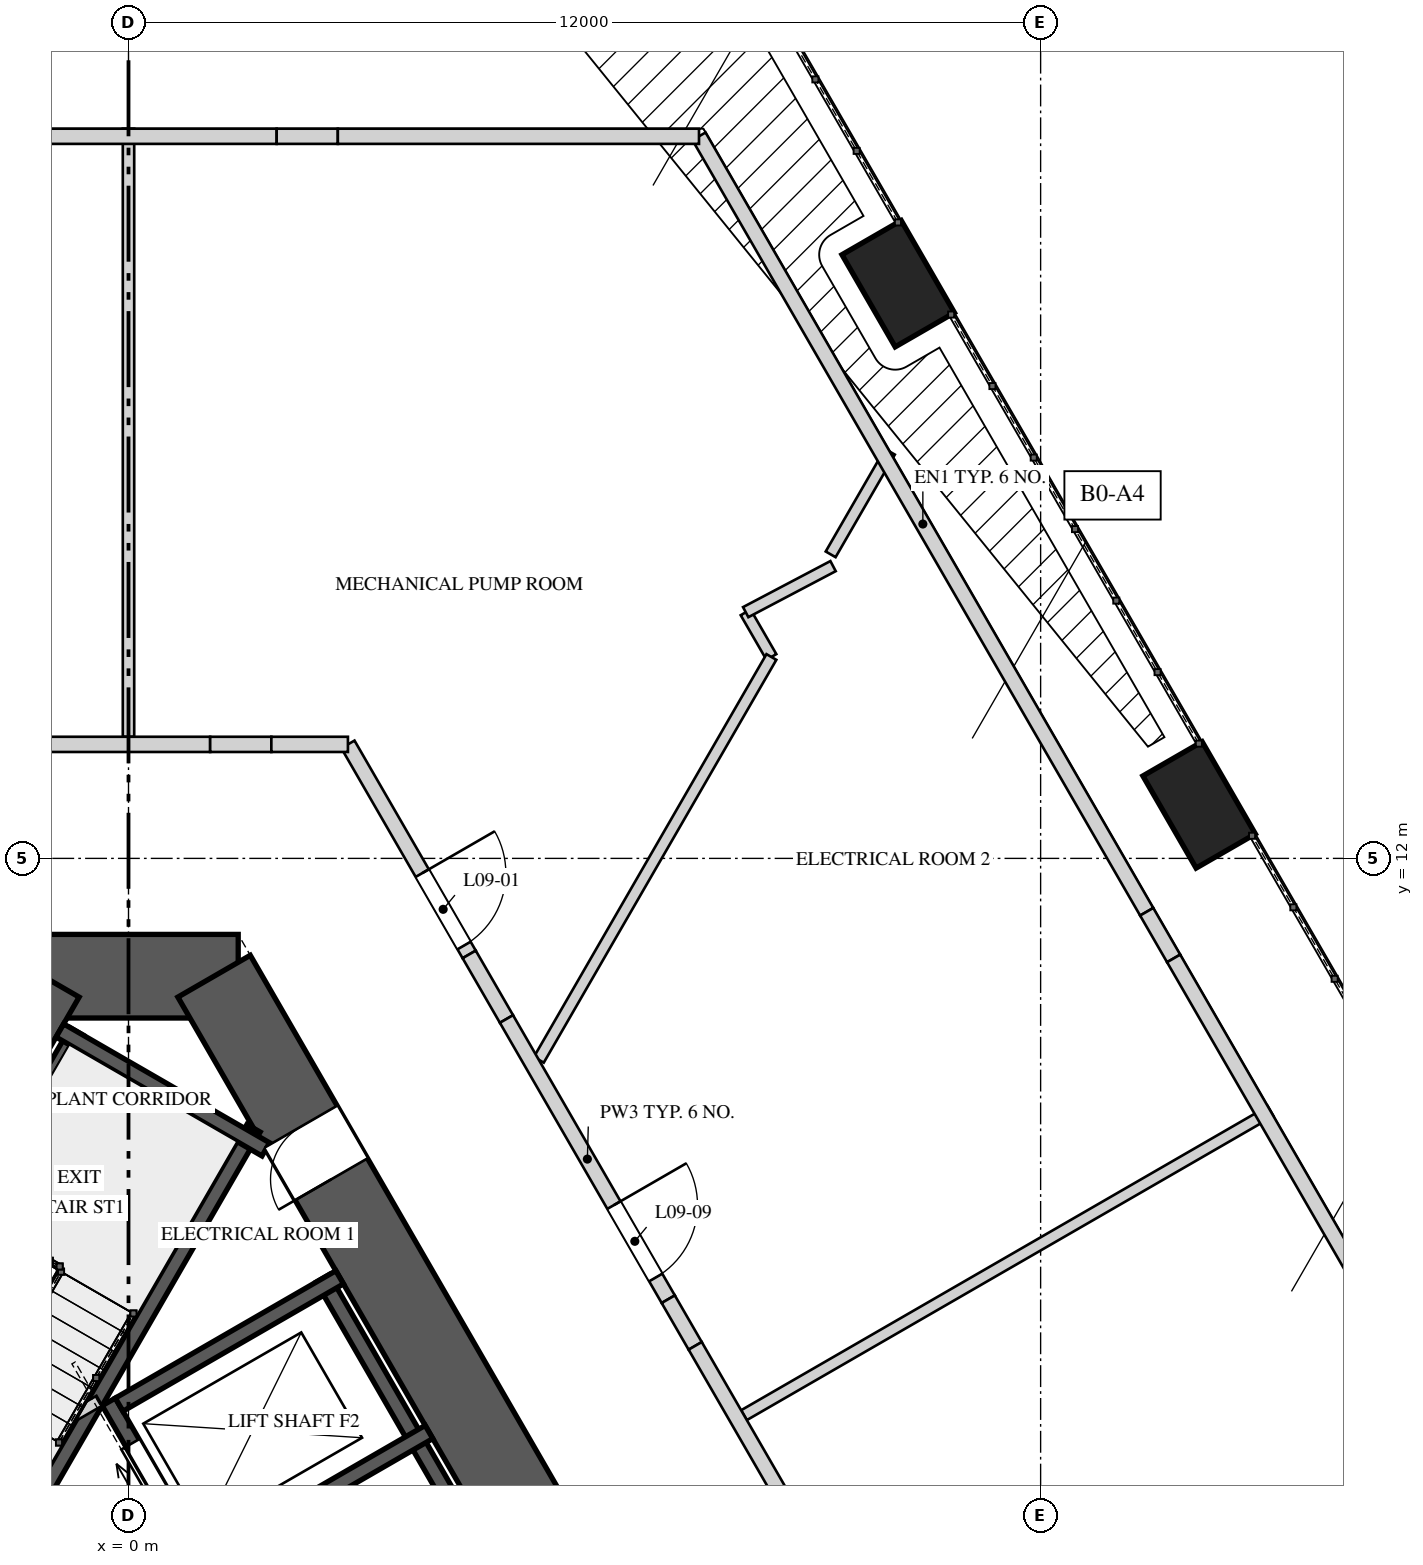
"""IFC4 building model, lengths in metres.
Left out: names, types, materials, properties, quantities, classifications, styles, units other than length and angle.
Written with IfcOpenShell. Run it as: python <this file> out.ifc"""

import sys

from ifc_helpers import new_model, si_unit, direction, frame, frame_2d, origin, origin_2d, place, context, subcontext, project, spatial, rectangle, extrude, element, fill, save


model = new_model("IFC4")
c1 = context("Model", 3, precision=1e-05, world=origin(), true_north=direction((0.0, 1.0)))
c2 = subcontext(c1, "Body", "Model", "MODEL_VIEW")
j1 = project(units=[si_unit("LENGTHUNIT", "METRE"), si_unit("PLANEANGLEUNIT", "RADIAN")], contexts=[c1])
p1 = place(None, origin())
s1 = spatial("IfcSite", under=j1, at=p1, CompositionType="ELEMENT")
p2 = place(p1, origin())
s2 = spatial("IfcBuilding", under=s1, at=p2, CompositionType="ELEMENT")
p3 = place(p2, frame((0.0, 0.0, 46.0)))
s3 = spatial("IfcBuildingStorey", under=s2, at=p3, CompositionType="ELEMENT", Elevation=46.0)
p4 = place(p3, frame((1.443, 10.45, 0.0), z_axis=(0.0, 0.0, 1.0), x_axis=(-1.0, 0.0, 0.0)))
e1 = element("IfcWall", 1, at=p4, inside=s3, PredefinedType="SHEAR", context=c2, shape_type="SweptSolid", body=[
    extrude(rectangle(XDim=2.887, YDim=1.1, at=frame_2d((1.443, 0.0))), origin(), (0.0, 0.0, 1.0), 5.2),
])
p5 = place(p3, frame((-1.126, 10.45, 0.0), z_axis=(0.0, 0.0, 1.0), x_axis=(-0.500001757713, -0.866024388966, 0.0)))
e2 = element("IfcWall", 2, at=p5, inside=s3, PredefinedType="SHEAR", context=c2, shape_type="SweptSolid", body=[
    extrude(rectangle(XDim=16.974, YDim=1.1, at=frame_2d((8.487, 0.0))), origin(), (0.0, 0.0, 1.0), 5.2),
])
p6 = place(p5, frame((6.692, 0.0, 0.0)))
e3 = element("IfcOpeningElement", 3, at=p6, cuts=e2, PredefinedType="OPENING", context=c2, shape_type="SweptSolid", body=[
    extrude(rectangle(XDim=1.0, YDim=2.4, at=frame_2d((0.5, 1.2))), frame((0.0, 0.56, 0.0), z_axis=(0.0, -1.0, 0.0), x_axis=(1.0, 0.0, 0.0)), (0.0, 0.0, 1.0), 1.12),
])
p7 = place(p3, frame((9.613, -4.25, 0.0), z_axis=(0.0, 0.0, 1.0), x_axis=(-0.500001757713, 0.866024388966, 0.0)))
e4 = element("IfcWall", 4, at=p7, inside=s3, PredefinedType="SHEAR", context=c2, shape_type="SweptSolid", body=[
    extrude(rectangle(XDim=16.974, YDim=1.1, at=frame_2d((8.487, 0.0))), origin(), (0.0, 0.0, 1.0), 5.2),
])
p8 = place(p7, frame((6.762, 0.0, 0.0)))
e5 = element("IfcOpeningElement", 5, at=p8, cuts=e4, PredefinedType="OPENING", context=c2, shape_type="SweptSolid", body=[
    extrude(rectangle(XDim=1.0, YDim=2.4, at=frame_2d((0.5, 1.2))), frame((0.0, 0.56, 0.0), z_axis=(0.0, -1.0, 0.0), x_axis=(1.0, 0.0, 0.0)), (0.0, 0.0, 1.0), 1.12),
])
p9 = place(p7, frame((13.889, 0.0, 0.0)))
e6 = element("IfcOpeningElement", 6, at=p9, cuts=e4, PredefinedType="OPENING", context=c2, shape_type="SweptSolid", body=[
    extrude(rectangle(XDim=0.8, YDim=2.1, at=frame_2d((0.4, 1.05))), frame((0.0, 0.56, 0.0), z_axis=(0.0, -1.0, 0.0), x_axis=(1.0, 0.0, 0.0)), (0.0, 0.0, 1.0), 1.12),
])
for number, where, z_axis, x_axis in (
    (7, (14.085, 12.704, 0.0), (0.0, 0.0, 1.0), (-0.5, 0.866, 0.0)),
    (8, (10.126, 19.561, 0.0), (0.0, 0.0, 1.0), (-0.5, 0.866, 0.0)),
):
    element("IfcColumn", number, at=place(p3, frame(where, z_axis=z_axis, x_axis=x_axis)), inside=s3, PredefinedType="COLUMN", context=c2, shape_type="SweptSolid", body=[
        extrude(rectangle(XDim=1.4, YDim=0.9, at=origin_2d()), origin(), (0.0, 0.0, 1.0), 2.898),
    ])
p10 = place(p3, frame((-0.68, 9.722, 0.0), z_axis=(0.0, 0.0, 1.0), x_axis=(-0.49998037582, -0.866036733513, 0.0)))
e9 = element("IfcWall", 9, at=p10, inside=s3, PredefinedType="SOLIDWALL", context=c2, shape_type="SweptSolid", body=[
    extrude(rectangle(XDim=6.2, YDim=0.2, at=frame_2d((3.1, 0.0))), origin(), (0.0, 0.0, 1.0), 4.85),
])
p11 = place(p3, frame((1.646, 8.45, 0.0), z_axis=(0.0, 0.0, 1.0), x_axis=(-0.500006002103, -0.866021938441, 0.0)))
e10 = element("IfcWall", 10, at=p11, inside=s3, PredefinedType="SOLIDWALL", context=c2, shape_type="SweptSolid", body=[
    extrude(rectangle(XDim=6.261, YDim=0.2, at=frame_2d((3.13, 0.0))), origin(), (0.0, 0.0, 1.0), 4.85),
])
p12 = place(p3, frame((1.806, 8.172, 0.0), z_axis=(0.0, 0.0, 1.0), x_axis=(-0.866054327916, 0.499949898588, 0.0)))
e11 = element("IfcWall", 11, at=p12, inside=s3, PredefinedType="SOLIDWALL", context=c2, shape_type="SweptSolid", body=[
    extrude(rectangle(XDim=3.128, YDim=0.2, at=frame_2d((1.564, 0.0))), origin(), (0.0, 0.0, 1.0), 4.85),
])
p13 = place(p3, frame((2.19, 0.606, 0.0), z_axis=(0.0, 0.0, 1.0), x_axis=(-0.500002801628, 0.866023786258, 0.0)))
e12 = element("IfcWall", 12, at=p13, inside=s3, PredefinedType="SOLIDWALL", context=c2, shape_type="SweptSolid", body=[
    extrude(rectangle(XDim=4.9, YDim=0.2, at=frame_2d((2.45, 0.0))), origin(), (0.0, 0.0, 1.0), 4.85),
])
p14 = place(p13, frame((0.625, 0.0, 0.0)))
e13 = element("IfcOpeningElement", 13, at=p14, cuts=e12, PredefinedType="OPENING", context=c2, shape_type="SweptSolid", body=[
    extrude(rectangle(XDim=1.3, YDim=2.1, at=frame_2d((0.65, 1.05))), frame((0.0, 0.11, 0.0), z_axis=(0.0, -1.0, 0.0), x_axis=(1.0, 0.0, 0.0)), (0.0, 0.0, 1.0), 0.22),
])
p15 = place(p13, frame((2.975, 0.0, 0.0)))
e14 = element("IfcOpeningElement", 14, at=p15, cuts=e12, PredefinedType="OPENING", context=c2, shape_type="SweptSolid", body=[
    extrude(rectangle(XDim=1.3, YDim=2.1, at=frame_2d((0.65, 1.05))), frame((0.0, 0.11, 0.0), z_axis=(0.0, -1.0, 0.0), x_axis=(1.0, 0.0, 0.0)), (0.0, 0.0, 1.0), 0.22),
])
p16 = place(p3, frame((5.005, 2.231, 0.0), z_axis=(0.0, 0.0, 1.0), x_axis=(-0.500002801628, 0.866023786258, 0.0)))
e15 = element("IfcWall", 15, at=p16, inside=s3, PredefinedType="SOLIDWALL", context=c2, shape_type="SweptSolid", body=[
    extrude(rectangle(XDim=4.9, YDim=0.2, at=frame_2d((2.45, 0.0))), origin(), (0.0, 0.0, 1.0), 4.85),
])
p17 = place(p3, frame((1.052, 2.778, 0.0), z_axis=(0.0, 0.0, 1.0), x_axis=(0.866032680314, 0.499987396469, 0.0)))
e16 = element("IfcWall", 16, at=p17, inside=s3, PredefinedType="SOLIDWALL", context=c2, shape_type="SweptSolid", body=[
    extrude(rectangle(XDim=3.35, YDim=0.2, at=frame_2d((1.675, 0.0))), origin(), (0.0, 0.0, 1.0), 4.85),
])
p18 = place(p3, frame((-0.123, 4.813, 0.0), z_axis=(0.0, 0.0, 1.0), x_axis=(0.866014461049, 0.500018952895, 0.0)))
e17 = element("IfcWall", 17, at=p18, inside=s3, PredefinedType="SOLIDWALL", context=c2, shape_type="SweptSolid", body=[
    extrude(rectangle(XDim=3.35, YDim=0.2, at=frame_2d((1.675, 0.0))), origin(), (0.0, 0.0, 1.0), 4.85),
])
p19 = place(p3, frame((-1.51, 4.215, 0.0), z_axis=(0.0, 0.0, 1.0), x_axis=(0.866085525409, 0.49989585183, 0.0)))
e18 = element("IfcWall", 18, at=p19, inside=s3, PredefinedType="PARTITIONING", context=c2, shape_type="SweptSolid", body=[
    extrude(rectangle(XDim=1.3, YDim=0.15, at=frame_2d((0.65, 0.0))), origin(), (0.0, 0.0, 1.0), 4.85),
])
for number, where, z_axis, x_axis in (
    (19, (0.0, 13.6, 0.0), (0.0, 0.0, 1.0), (0.0, 1.0, 0.0)),
    (20, (8.097, 4.675, 0.0), (0.0, 0.0, 1.0), (0.866, 0.5, 0.0)),
):
    element("IfcWall", number, at=place(p3, frame(where, z_axis=z_axis, x_axis=x_axis)), inside=s3, PredefinedType="PARTITIONING", context=c2, shape_type="SweptSolid", body=[
        extrude(rectangle(XDim=8.0, YDim=0.15, at=frame_2d((4.0, 0.0))), origin(), (0.0, 0.0, 1.0), 4.85),
    ])
p20 = place(p3, frame((8.119, 15.237, 0.0), z_axis=(0.0, 0.0, 1.0), x_axis=(0.500013496215, -0.866017611601, 0.0)))
e21 = element("IfcWall", 21, at=p20, inside=s3, PredefinedType="PARTITIONING", context=c2, shape_type="SweptSolid", body=[
    extrude(rectangle(XDim=0.678, YDim=0.15, at=frame_2d((0.339, 0.0))), origin(), (0.0, 0.0, 1.0), 4.85),
])
p21 = place(p3, frame((8.458, 14.65, 0.0), z_axis=(0.0, 0.0, 1.0), x_axis=(-0.500013695359, -0.866017496621, 0.0)))
e22 = element("IfcWall", 22, at=p21, inside=s3, PredefinedType="PARTITIONING", context=c2, shape_type="SweptSolid", body=[
    extrude(rectangle(XDim=6.119, YDim=0.15, at=frame_2d((3.06, 0.0))), origin(), (0.0, 0.0, 1.0), 4.85),
])
p22 = place(p3, frame((9.269, 15.845, 0.0), z_axis=(0.0, 0.0, 1.0), x_axis=(-0.884677612946, -0.466203304528, 0.0)))
e23 = element("IfcWall", 23, at=p22, inside=s3, PredefinedType="PARTITIONING", context=c2, shape_type="SweptSolid", body=[
    extrude(rectangle(XDim=1.299, YDim=0.15, at=frame_2d((0.65, 0.0))), origin(), (0.0, 0.0, 1.0), 4.85),
])
p23 = place(p3, frame((10.017, 17.35, 0.0), z_axis=(0.0, 0.0, 1.0), x_axis=(-0.500097537186, -0.86596908334, 0.0)))
e24 = element("IfcWall", 24, at=p23, inside=s3, PredefinedType="PARTITIONING", context=c2, shape_type="SweptSolid", body=[
    extrude(rectangle(XDim=1.559, YDim=0.15, at=frame_2d((0.779, 0.0))), origin(), (0.0, 0.0, 1.0), 4.85),
])
p24 = place(p3, frame((2.887, 13.5, 0.0), z_axis=(0.0, 0.0, 1.0), x_axis=(0.50003154259, -0.866007191896, 0.0)))
e25 = element("IfcWall", 25, at=p24, inside=s3, PredefinedType="SOLIDWALL", context=c2, shape_type="SweptSolid", body=[
    extrude(rectangle(XDim=3.191, YDim=0.2, at=frame_2d((1.595, 0.0))), origin(), (0.0, 0.0, 1.0), 4.85),
])
p25 = place(p24, frame((1.956, 0.0, 0.0)))
e26 = element("IfcOpeningElement", 26, at=p25, cuts=e25, PredefinedType="OPENING", context=c2, shape_type="SweptSolid", body=[
    extrude(rectangle(XDim=1.1, YDim=2.2, at=frame_2d((0.55, 1.1))), frame((0.0, 0.11, 0.0), z_axis=(0.0, -1.0, 0.0), x_axis=(1.0, 0.0, 0.0)), (0.0, 0.0, 1.0), 0.22),
])
p26 = place(p3, frame((4.482, 10.737, 0.0), z_axis=(0.0, 0.0, 1.0), x_axis=(0.499966601515, -0.86604468555, 0.0)))
e27 = element("IfcWall", 27, at=p26, inside=s3, PredefinedType="SOLIDWALL", context=c2, shape_type="SweptSolid", body=[
    extrude(rectangle(XDim=0.981, YDim=0.2, at=frame_2d((0.49, 0.0))), origin(), (0.0, 0.0, 1.0), 3.95),
])
p27 = place(p3, frame((4.973, 9.887, 0.0), z_axis=(0.0, 0.0, 1.0), x_axis=(0.500000470374, -0.866025132214, 0.0)))
e28 = element("IfcWall", 28, at=p27, inside=s3, PredefinedType="SOLIDWALL", context=c2, shape_type="SweptSolid", body=[
    extrude(rectangle(XDim=4.257, YDim=0.2, at=frame_2d((2.128, 0.0))), origin(), (0.0, 0.0, 1.0), 4.85),
])
p28 = place(p27, frame((2.827, 0.0, 0.0)))
e29 = element("IfcOpeningElement", 29, at=p28, cuts=e28, PredefinedType="OPENING", context=c2, shape_type="SweptSolid", body=[
    extrude(rectangle(XDim=1.1, YDim=2.2, at=frame_2d((0.55, 1.1))), frame((0.0, 0.11, 0.0), z_axis=(0.0, -1.0, 0.0), x_axis=(1.0, 0.0, 0.0)), (0.0, 0.0, 1.0), 0.22),
])
p29 = place(p3, frame((7.101, 6.201, 0.0), z_axis=(0.0, 0.0, 1.0), x_axis=(0.499881507708, -0.866093804534, 0.0)))
e30 = element("IfcWall", 30, at=p29, inside=s3, PredefinedType="SOLIDWALL", context=c2, shape_type="SweptSolid", body=[
    extrude(rectangle(XDim=0.709, YDim=0.2, at=frame_2d((0.354, 0.0))), origin(), (0.0, 0.0, 1.0), 4.15),
])
p30 = place(p3, frame((7.455, 5.587, 0.0), z_axis=(0.0, 0.0, 1.0), x_axis=(0.500013241293, -0.866017758786, 0.0)))
e31 = element("IfcWall", 31, at=p30, inside=s3, PredefinedType="SOLIDWALL", context=c2, shape_type="SweptSolid", body=[
    extrude(rectangle(XDim=3.585, YDim=0.2, at=frame_2d((1.793, 0.0))), origin(), (0.0, 0.0, 1.0), 4.85),
])
p31 = place(p3, frame((-2.887, 13.5, 0.0), z_axis=(0.0, 0.0, 1.0), x_axis=(1.0, 0.0, 0.0)))
e32 = element("IfcWall", 32, at=p31, inside=s3, PredefinedType="SOLIDWALL", context=c2, shape_type="SweptSolid", body=[
    extrude(rectangle(XDim=3.961, YDim=0.2, at=frame_2d((1.98, 0.0))), origin(), (0.0, 0.0, 1.0), 4.85),
])
p32 = place(p3, frame((1.074, 13.5, 0.0), z_axis=(0.0, 0.0, 1.0), x_axis=(1.0, 0.0, 0.0)))
e33 = element("IfcWall", 33, at=p32, inside=s3, PredefinedType="SOLIDWALL", context=c2, shape_type="SweptSolid", body=[
    extrude(rectangle(XDim=0.805, YDim=0.2, at=frame_2d((0.402, 0.0))), origin(), (0.0, 0.0, 1.0), 3.95),
])
p33 = place(p3, frame((1.879, 13.5, 0.0), z_axis=(0.0, 0.0, 1.0), x_axis=(1.0, 0.0, 0.0)))
e34 = element("IfcWall", 34, at=p33, inside=s3, PredefinedType="SOLIDWALL", context=c2, shape_type="SweptSolid", body=[
    extrude(rectangle(XDim=1.008, YDim=0.2, at=frame_2d((0.504, 0.0))), origin(), (0.0, 0.0, 1.0), 4.85),
])
p34 = place(p3, frame((7.506, 21.5, 0.0), z_axis=(0.0, 0.0, 1.0), x_axis=(0.500004108169, -0.866023031919, 0.0)))
e35 = element("IfcWall", 35, at=p34, inside=s3, PredefinedType="SOLIDWALL", context=c2, shape_type="SweptSolid", body=[
    extrude(rectangle(XDim=11.78, YDim=0.2, at=frame_2d((5.89, 0.0))), origin(), (0.0, 0.0, 1.0), 4.85),
])
p35 = place(p3, frame((13.396, 11.298, 0.0), z_axis=(0.0, 0.0, 1.0), x_axis=(0.499881507708, -0.866093804534, 0.0)))
e36 = element("IfcWall", 36, at=p35, inside=s3, PredefinedType="SOLIDWALL", context=c2, shape_type="SweptSolid", body=[
    extrude(rectangle(XDim=0.709, YDim=0.2, at=frame_2d((0.354, 0.0))), origin(), (0.0, 0.0, 1.0), 4.15),
])
p36 = place(p3, frame((13.75, 10.684, 0.0), z_axis=(0.0, 0.0, 1.0), x_axis=(0.499983921128, -0.866034686726, 0.0)))
e37 = element("IfcWall", 37, at=p36, inside=s3, PredefinedType="SOLIDWALL", context=c2, shape_type="SweptSolid", body=[
    extrude(rectangle(XDim=7.355, YDim=0.2, at=frame_2d((3.678, 0.0))), origin(), (0.0, 0.0, 1.0), 4.85),
])
p37 = place(p3, frame((-7.506, 21.5, 0.0), z_axis=(0.0, 0.0, 1.0), x_axis=(1.0, 0.0, 0.0)))
e38 = element("IfcWall", 38, at=p37, inside=s3, PredefinedType="SOLIDWALL", context=c2, shape_type="SweptSolid", body=[
    extrude(rectangle(XDim=9.455, YDim=0.2, at=frame_2d((4.728, 0.0))), origin(), (0.0, 0.0, 1.0), 4.85),
])
p38 = place(p37, frame((3.128, 0.0, 0.0)))
e39 = element("IfcOpeningElement", 39, at=p38, cuts=e38, PredefinedType="OPENING", context=c2, shape_type="SweptSolid", body=[
    extrude(rectangle(XDim=1.6, YDim=2.3, at=frame_2d((0.8, 1.15))), frame((0.0, 0.11, 0.0), z_axis=(0.0, -1.0, 0.0), x_axis=(1.0, 0.0, 0.0)), (0.0, 0.0, 1.0), 0.22),
])
p39 = place(p3, frame((1.949, 21.5, 0.0), z_axis=(0.0, 0.0, 1.0), x_axis=(1.0, 0.0, 0.0)))
e40 = element("IfcWall", 40, at=p39, inside=s3, PredefinedType="SOLIDWALL", context=c2, shape_type="SweptSolid", body=[
    extrude(rectangle(XDim=0.805, YDim=0.2, at=frame_2d((0.402, 0.0))), origin(), (0.0, 0.0, 1.0), 3.95),
])
p40 = place(p3, frame((2.754, 21.5, 0.0), z_axis=(0.0, 0.0, 1.0), x_axis=(1.0, 0.0, 0.0)))
e41 = element("IfcWall", 41, at=p40, inside=s3, PredefinedType="SOLIDWALL", context=c2, shape_type="SweptSolid", body=[
    extrude(rectangle(XDim=4.751, YDim=0.2, at=frame_2d((2.376, 0.0))), origin(), (0.0, 0.0, 1.0), 4.85),
])
p41 = place(p15, origin())
e42 = element("IfcDoor", 42, at=p41, inside=s3, OperationType="SLIDING_TO_RIGHT", PredefinedType="DOOR", context=c2, shape_type="SweptSolid", body=[
    extrude(rectangle(XDim=1.3, YDim=2.1, at=frame_2d((0.65, 1.05))), frame((0.0, 0.025, 0.0), z_axis=(0.0, -1.0, 0.0), x_axis=(1.0, 0.0, 0.0)), (0.0, 0.0, 1.0), 0.05),
])
fill(e14, e42)
p42 = place(p9, origin())
e43 = element("IfcDoor", 43, at=p42, inside=s3, OperationType="SINGLE_SWING_RIGHT", PredefinedType="DOOR", context=c2, shape_type="SweptSolid", body=[
    extrude(rectangle(XDim=0.8, YDim=2.1, at=frame_2d((0.4, 1.05))), frame((0.0, 0.025, 0.0), z_axis=(0.0, -1.0, 0.0), x_axis=(1.0, 0.0, 0.0)), (0.0, 0.0, 1.0), 0.05),
])
fill(e6, e43)
p43 = place(p25, origin())
e44 = element("IfcDoor", 44, at=p43, inside=s3, OperationType="SINGLE_SWING_LEFT", PredefinedType="DOOR", context=c2, shape_type="SweptSolid", body=[
    extrude(rectangle(XDim=1.1, YDim=2.2, at=frame_2d((0.55, 1.1))), frame((0.0, 0.025, 0.0), z_axis=(0.0, -1.0, 0.0), x_axis=(1.0, 0.0, 0.0)), (0.0, 0.0, 1.0), 0.05),
])
fill(e26, e44)
p44 = place(p28, origin())
e45 = element("IfcDoor", 45, at=p44, inside=s3, OperationType="SINGLE_SWING_LEFT", PredefinedType="DOOR", context=c2, shape_type="SweptSolid", body=[
    extrude(rectangle(XDim=1.1, YDim=2.2, at=frame_2d((0.55, 1.1))), frame((0.0, 0.025, 0.0), z_axis=(0.0, -1.0, 0.0), x_axis=(1.0, 0.0, 0.0)), (0.0, 0.0, 1.0), 0.05),
])
fill(e29, e45)
save(model, sys.argv[1])
